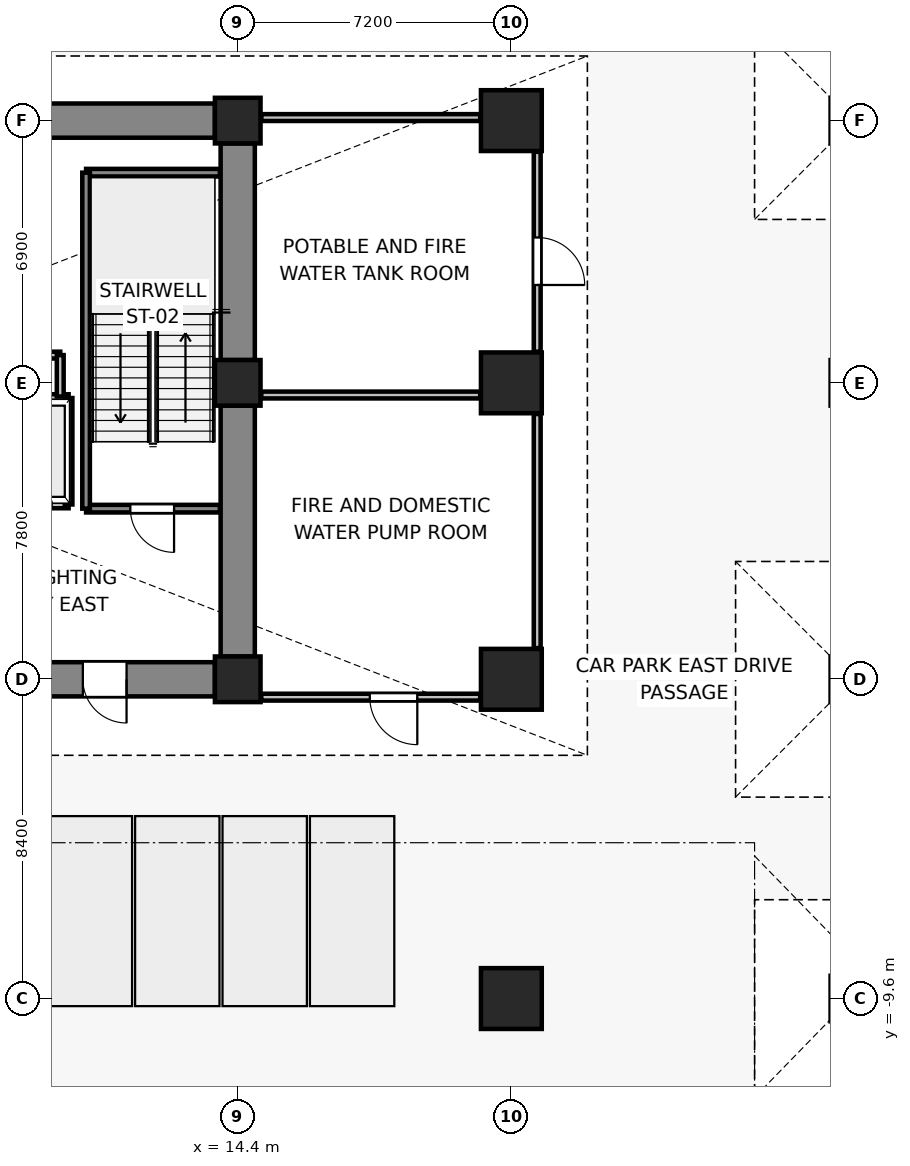
"""IFC4 building model, lengths in metres.
Left out: names, types, materials, properties, quantities, classifications, styles, units other than length and angle.
Written with IfcOpenShell. Run it as: python <this file> out.ifc"""

import sys

from ifc_helpers import new_model, si_unit, direction, frame, frame_2d, origin, origin_2d, place, context, subcontext, project, spatial, rectangle, extrude, source, transform, mapped, element, fill, save


model = new_model("IFC4")
c1 = context("Model", 3, precision=1e-05, world=origin(), true_north=direction((0.0, 1.0)))
c2 = subcontext(c1, "Body", "Model", "MODEL_VIEW")
j1 = project(units=[si_unit("LENGTHUNIT", "METRE"), si_unit("PLANEANGLEUNIT", "RADIAN")], contexts=[c1])
p1 = place(None, origin())
s1 = spatial("IfcSite", under=j1, at=p1, CompositionType="ELEMENT")
p2 = place(p1, origin())
s2 = spatial("IfcBuilding", under=s1, at=p2, CompositionType="ELEMENT")
p3 = place(p2, frame((0.0, 0.0, -13.2)))
s3 = spatial("IfcBuildingStorey", under=s2, at=p3, CompositionType="ELEMENT", Elevation=-13.2)
for number, where, z_axis, x_axis in (
    (1, (14.4, -1.2, 0.0), (0.0, 0.0, 1.0), (1.0, 0.0, 0.0)),
    (2, (14.4, 6.6, 0.0), (0.0, 0.0, 1.0), (1.0, 0.0, 0.0)),
    (3, (14.4, 13.5, 0.0), (0.0, 0.0, 1.0), (1.0, 0.0, 0.0)),
):
    element("IfcColumn", number, at=place(p3, frame(where, z_axis=z_axis, x_axis=x_axis)), inside=s3, PredefinedType="COLUMN", context=c2, shape_type="SweptSolid", body=[
        extrude(rectangle(XDim=1.2, YDim=1.2, at=origin_2d()), origin(), (0.0, 0.0, 1.0), 4.4),
    ])
for number, where, z_axis, x_axis in (
    (4, (21.6, -9.6, 0.0), (0.0, 0.0, 1.0), (1.0, 0.0, 0.0)),
    (5, (21.6, -1.2, 0.0), (0.0, 0.0, 1.0), (1.0, 0.0, 0.0)),
    (6, (21.6, 6.6, 0.0), (0.0, 0.0, 1.0), (1.0, 0.0, 0.0)),
    (7, (21.6, 13.5, 0.0), (0.0, 0.0, 1.0), (1.0, 0.0, 0.0)),
):
    element("IfcColumn", number, at=place(p3, frame(where, z_axis=z_axis, x_axis=x_axis)), inside=s3, PredefinedType="COLUMN", context=c2, shape_type="SweptSolid", body=[
        extrude(rectangle(XDim=1.6, YDim=1.6, at=origin_2d()), origin(), (0.0, 0.0, 1.0), 4.4),
    ])
p4 = place(p3, frame((7.8, 13.5, 0.0), z_axis=(0.0, 0.0, 1.0), x_axis=(1.0, 0.0, 0.0)))
e8 = element("IfcWall", 8, at=p4, inside=s3, PredefinedType="SHEAR", context=c2, shape_type="SweptSolid", body=[
    extrude(rectangle(XDim=6.0, YDim=0.9, at=frame_2d((3.0, 0.0))), origin(), (0.0, 0.0, 1.0), 4.12),
])
p5 = place(p3, frame((14.4, -0.6, 0.0), z_axis=(0.0, 0.0, 1.0), x_axis=(0.0, 1.0, 0.0)))
e9 = element("IfcWall", 9, at=p5, inside=s3, PredefinedType="SHEAR", context=c2, shape_type="SweptSolid", body=[
    extrude(rectangle(XDim=6.6, YDim=0.9, at=frame_2d((3.3, 0.0))), origin(), (0.0, 0.0, 1.0), 4.12),
])
p6 = place(p3, frame((14.4, 7.2, 0.0), z_axis=(0.0, 0.0, 1.0), x_axis=(0.0, 1.0, 0.0)))
e10 = element("IfcWall", 10, at=p6, inside=s3, PredefinedType="SHEAR", context=c2, shape_type="SweptSolid", body=[
    extrude(rectangle(XDim=5.7, YDim=0.9, at=frame_2d((2.85, 0.0))), origin(), (0.0, 0.0, 1.0), 4.12),
])
p7 = place(p3, frame((13.8, -1.2, 0.0), z_axis=(0.0, 0.0, 1.0), x_axis=(-1.0, 0.0, 0.0)))
e11 = element("IfcWall", 11, at=p7, inside=s3, PredefinedType="SHEAR", context=c2, shape_type="SweptSolid", body=[
    extrude(rectangle(XDim=6.0, YDim=0.9, at=frame_2d((3.0, 0.0))), origin(), (0.0, 0.0, 1.0), 4.12),
])
p8 = place(p7, frame((2.325, 0.0, 0.0)))
e12 = element("IfcOpeningElement", 12, at=p8, cuts=e11, PredefinedType="OPENING", context=c2, shape_type="SweptSolid", body=[
    extrude(rectangle(XDim=1.15, YDim=2.15, at=frame_2d((0.575, 1.075))), frame((0.0, 0.46, 0.0), z_axis=(0.0, -1.0, 0.0), x_axis=(1.0, 0.0, 0.0)), (0.0, 0.0, 1.0), 0.92),
])
p9 = place(p3, frame((9.95, 3.4, 0.0), z_axis=(0.0, 0.0, 1.0), x_axis=(-1.0, 0.0, 0.0)))
e13 = element("IfcWall", 13, at=p9, inside=s3, PredefinedType="SOLIDWALL", context=c2, shape_type="SweptSolid", body=[
    extrude(rectangle(XDim=2.0, YDim=0.2, at=frame_2d((1.0, 0.0))), origin(), (0.0, 0.0, 1.0), 4.12),
])
p10 = place(p9, frame((0.45, 0.0, 0.0)))
e14 = element("IfcOpeningElement", 14, at=p10, cuts=e13, PredefinedType="OPENING", context=c2, shape_type="SweptSolid", body=[
    extrude(rectangle(XDim=1.1, YDim=2.2, at=frame_2d((0.55, 1.1))), frame((0.0, 0.11, 0.0), z_axis=(0.0, -1.0, 0.0), x_axis=(1.0, 0.0, 0.0)), (0.0, 0.0, 1.0), 0.22),
])
p11 = place(p3, frame((7.95, 6.2, 0.0), z_axis=(0.0, 0.0, 1.0), x_axis=(1.0, 0.0, 0.0)))
e15 = element("IfcWall", 15, at=p11, inside=s3, PredefinedType="SOLIDWALL", context=c2, shape_type="SweptSolid", body=[
    extrude(rectangle(XDim=2.0, YDim=0.2, at=frame_2d((1.0, 0.0))), origin(), (0.0, 0.0, 1.0), 4.12),
])
p12 = place(p3, frame((9.95, 6.2, 0.0), z_axis=(0.0, 0.0, 1.0), x_axis=(0.0, -1.0, 0.0)))
e16 = element("IfcWall", 16, at=p12, inside=s3, PredefinedType="SOLIDWALL", context=c2, shape_type="SweptSolid", body=[
    extrude(rectangle(XDim=2.8, YDim=0.2, at=frame_2d((1.4, 0.0))), origin(), (0.0, 0.0, 1.0), 4.12),
])
p13 = place(p3, frame((13.93, 3.29, 0.0), z_axis=(0.0, 0.0, 1.0), x_axis=(-1.0, 0.0, 0.0)))
e17 = element("IfcWall", 17, at=p13, inside=s3, PredefinedType="SOLIDWALL", context=c2, shape_type="SweptSolid", body=[
    extrude(rectangle(XDim=3.52, YDim=0.2, at=frame_2d((1.76, 0.0))), origin(), (0.0, 0.0, 1.0), 4.12),
])
p14 = place(p13, frame((1.205, 0.0, 0.0)))
e18 = element("IfcOpeningElement", 18, at=p14, cuts=e17, PredefinedType="OPENING", context=c2, shape_type="SweptSolid", body=[
    extrude(rectangle(XDim=1.15, YDim=2.15, at=frame_2d((0.575, 1.075))), frame((0.0, 0.11, 0.0), z_axis=(0.0, -1.0, 0.0), x_axis=(1.0, 0.0, 0.0)), (0.0, 0.0, 1.0), 0.22),
])
p15 = place(p3, frame((10.41, 12.13, 0.0), z_axis=(0.0, 0.0, 1.0), x_axis=(1.0, 0.0, 0.0)))
e19 = element("IfcWall", 19, at=p15, inside=s3, PredefinedType="SOLIDWALL", context=c2, shape_type="SweptSolid", body=[
    extrude(rectangle(XDim=3.52, YDim=0.2, at=frame_2d((1.76, 0.0))), origin(), (0.0, 0.0, 1.0), 4.12),
])
p16 = place(p3, frame((10.41, 3.29, 0.0), z_axis=(0.0, 0.0, 1.0), x_axis=(0.0, 1.0, 0.0)))
e20 = element("IfcWall", 20, at=p16, inside=s3, PredefinedType="SOLIDWALL", context=c2, shape_type="SweptSolid", body=[
    extrude(rectangle(XDim=8.84, YDim=0.2, at=frame_2d((4.42, 0.0))), origin(), (0.0, 0.0, 1.0), 4.12),
])
p17 = place(p3, frame((7.47, 7.33, 0.0), z_axis=(0.0, 0.0, 1.0), x_axis=(1.0, 0.0, 0.0)))
e21 = element("IfcWall", 21, at=p17, inside=s3, PredefinedType="PARTITIONING", context=c2, shape_type="SweptSolid", body=[
    extrude(rectangle(XDim=2.26, YDim=0.18, at=frame_2d((1.13, 0.0))), origin(), (0.0, 0.0, 1.0), 3.41),
])
p18 = place(p17, frame((0.69, 0.0, 0.0)))
e22 = element("IfcOpeningElement", 22, at=p18, cuts=e21, PredefinedType="OPENING", context=c2, shape_type="SweptSolid", body=[
    extrude(rectangle(XDim=0.88, YDim=2.1, at=frame_2d((0.44, 1.05))), frame((0.0, 0.1, 0.0), z_axis=(0.0, -1.0, 0.0), x_axis=(1.0, 0.0, 0.0)), (0.0, 0.0, 1.0), 0.2),
])
p19 = place(p3, frame((9.73, 7.33, 0.0), z_axis=(0.0, 0.0, 1.0), x_axis=(0.0, -1.0, 0.0)))
e23 = element("IfcWall", 23, at=p19, inside=s3, PredefinedType="PARTITIONING", context=c2, shape_type="SweptSolid", body=[
    extrude(rectangle(XDim=1.09, YDim=0.18, at=frame_2d((0.545, 0.0))), origin(), (0.0, 0.0, 1.0), 4.12),
])
p20 = place(p3, frame((20.78, -1.67, 0.0), z_axis=(0.0, 0.0, 1.0), x_axis=(-1.0, 0.0, 0.0)))
e24 = element("IfcWall", 24, at=p20, inside=s3, PredefinedType="PARTITIONING", context=c2, shape_type="SweptSolid", body=[
    extrude(rectangle(XDim=5.76, YDim=0.18, at=frame_2d((2.88, 0.0))), origin(), (0.0, 0.0, 1.0), 4.12),
])
p21 = place(p20, frame((1.655, 0.0, 0.0)))
e25 = element("IfcOpeningElement", 25, at=p21, cuts=e24, PredefinedType="OPENING", context=c2, shape_type="SweptSolid", body=[
    extrude(rectangle(XDim=1.25, YDim=2.15, at=frame_2d((0.625, 1.075))), frame((0.0, 0.1, 0.0), z_axis=(0.0, -1.0, 0.0), x_axis=(1.0, 0.0, 0.0)), (0.0, 0.0, 1.0), 0.2),
])
p22 = place(p3, frame((15.02, 6.28, 0.0), z_axis=(0.0, 0.0, 1.0), x_axis=(1.0, 0.0, 0.0)))
e26 = element("IfcWall", 26, at=p22, inside=s3, PredefinedType="PARTITIONING", context=c2, shape_type="SweptSolid", body=[
    extrude(rectangle(XDim=5.76, YDim=0.18, at=frame_2d((2.88, 0.0))), origin(), (0.0, 0.0, 1.0), 4.12),
])
p23 = place(p3, frame((22.28, 5.78, 0.0), z_axis=(0.0, 0.0, 1.0), x_axis=(0.0, -1.0, 0.0)))
e27 = element("IfcWall", 27, at=p23, inside=s3, PredefinedType="PARTITIONING", context=c2, shape_type="SweptSolid", body=[
    extrude(rectangle(XDim=6.16, YDim=0.18, at=frame_2d((3.08, 0.0))), origin(), (0.0, 0.0, 1.0), 3.493),
])
p24 = place(p3, frame((15.02, 13.58, 0.0), z_axis=(0.0, 0.0, 1.0), x_axis=(1.0, 0.0, 0.0)))
e28 = element("IfcWall", 28, at=p24, inside=s3, PredefinedType="PARTITIONING", context=c2, shape_type="SweptSolid", body=[
    extrude(rectangle(XDim=5.76, YDim=0.18, at=frame_2d((2.88, 0.0))), origin(), (0.0, 0.0, 1.0), 3.41),
])
p25 = place(p3, frame((22.28, 12.68, 0.0), z_axis=(0.0, 0.0, 1.0), x_axis=(0.0, -1.0, 0.0)))
e29 = element("IfcWall", 29, at=p25, inside=s3, PredefinedType="PARTITIONING", context=c2, shape_type="SweptSolid", body=[
    extrude(rectangle(XDim=5.26, YDim=0.18, at=frame_2d((2.63, 0.0))), origin(), (0.0, 0.0, 1.0), 4.12),
])
p26 = place(p25, frame((2.255, 0.0, 0.0)))
e30 = element("IfcOpeningElement", 30, at=p26, cuts=e29, PredefinedType="OPENING", context=c2, shape_type="SweptSolid", body=[
    extrude(rectangle(XDim=1.25, YDim=2.15, at=frame_2d((0.625, 1.075))), frame((0.0, 0.1, 0.0), z_axis=(0.0, -1.0, 0.0), x_axis=(1.0, 0.0, 0.0)), (0.0, 0.0, 1.0), 0.2),
])
m1 = source(origin(), c2, "Body", "SweptSolid", [
    extrude(rectangle(XDim=1.15, YDim=2.15, at=frame_2d((0.575, 1.075))), frame((0.0, 0.025, 0.0), z_axis=(0.0, -1.0, 0.0), x_axis=(1.0, 0.0, 0.0)), (0.0, 0.0, 1.0), 0.05),
])
p27 = place(p14, origin())
e31 = element("IfcDoor", 31, at=p27, inside=s3, OperationType="SINGLE_SWING_LEFT", PredefinedType="DOOR", context=c2, shape_type="MappedRepresentation", body=[
    mapped(m1, transform((0.0, 0.0, 0.0), x_axis=(1.0, 0.0, 0.0), y_axis=(0.0, 1.0, 0.0), z_axis=(0.0, 0.0, 1.0), scale=1.0)),
])
fill(e18, e31)
p28 = place(p8, origin())
e32 = element("IfcDoor", 32, at=p28, inside=s3, OperationType="SINGLE_SWING_LEFT", PredefinedType="DOOR", context=c2, shape_type="MappedRepresentation", body=[
    mapped(m1, transform((0.0, 0.0, 0.0), x_axis=(1.0, 0.0, 0.0), y_axis=(0.0, 1.0, 0.0), z_axis=(0.0, 0.0, 1.0), scale=1.0)),
])
fill(e12, e32)
m2 = source(origin(), c2, "Body", "SweptSolid", [
    extrude(rectangle(XDim=1.25, YDim=2.15, at=frame_2d((0.625, 1.075))), frame((0.0, 0.025, 0.0), z_axis=(0.0, -1.0, 0.0), x_axis=(1.0, 0.0, 0.0)), (0.0, 0.0, 1.0), 0.05),
])
p29 = place(p21, origin())
e33 = element("IfcDoor", 33, at=p29, inside=s3, OperationType="SINGLE_SWING_LEFT", PredefinedType="DOOR", context=c2, shape_type="MappedRepresentation", body=[
    mapped(m2, transform((0.0, 0.0, 0.0), x_axis=(1.0, 0.0, 0.0), y_axis=(0.0, 1.0, 0.0), z_axis=(0.0, 0.0, 1.0), scale=1.0)),
])
fill(e25, e33)
p30 = place(p26, origin())
e34 = element("IfcDoor", 34, at=p30, inside=s3, OperationType="SINGLE_SWING_RIGHT", PredefinedType="DOOR", context=c2, shape_type="MappedRepresentation", body=[
    mapped(m2, transform((0.0, 0.0, 0.0), x_axis=(1.0, 0.0, 0.0), y_axis=(0.0, 1.0, 0.0), z_axis=(0.0, 0.0, 1.0), scale=1.0)),
])
fill(e30, e34)
save(model, sys.argv[1])
